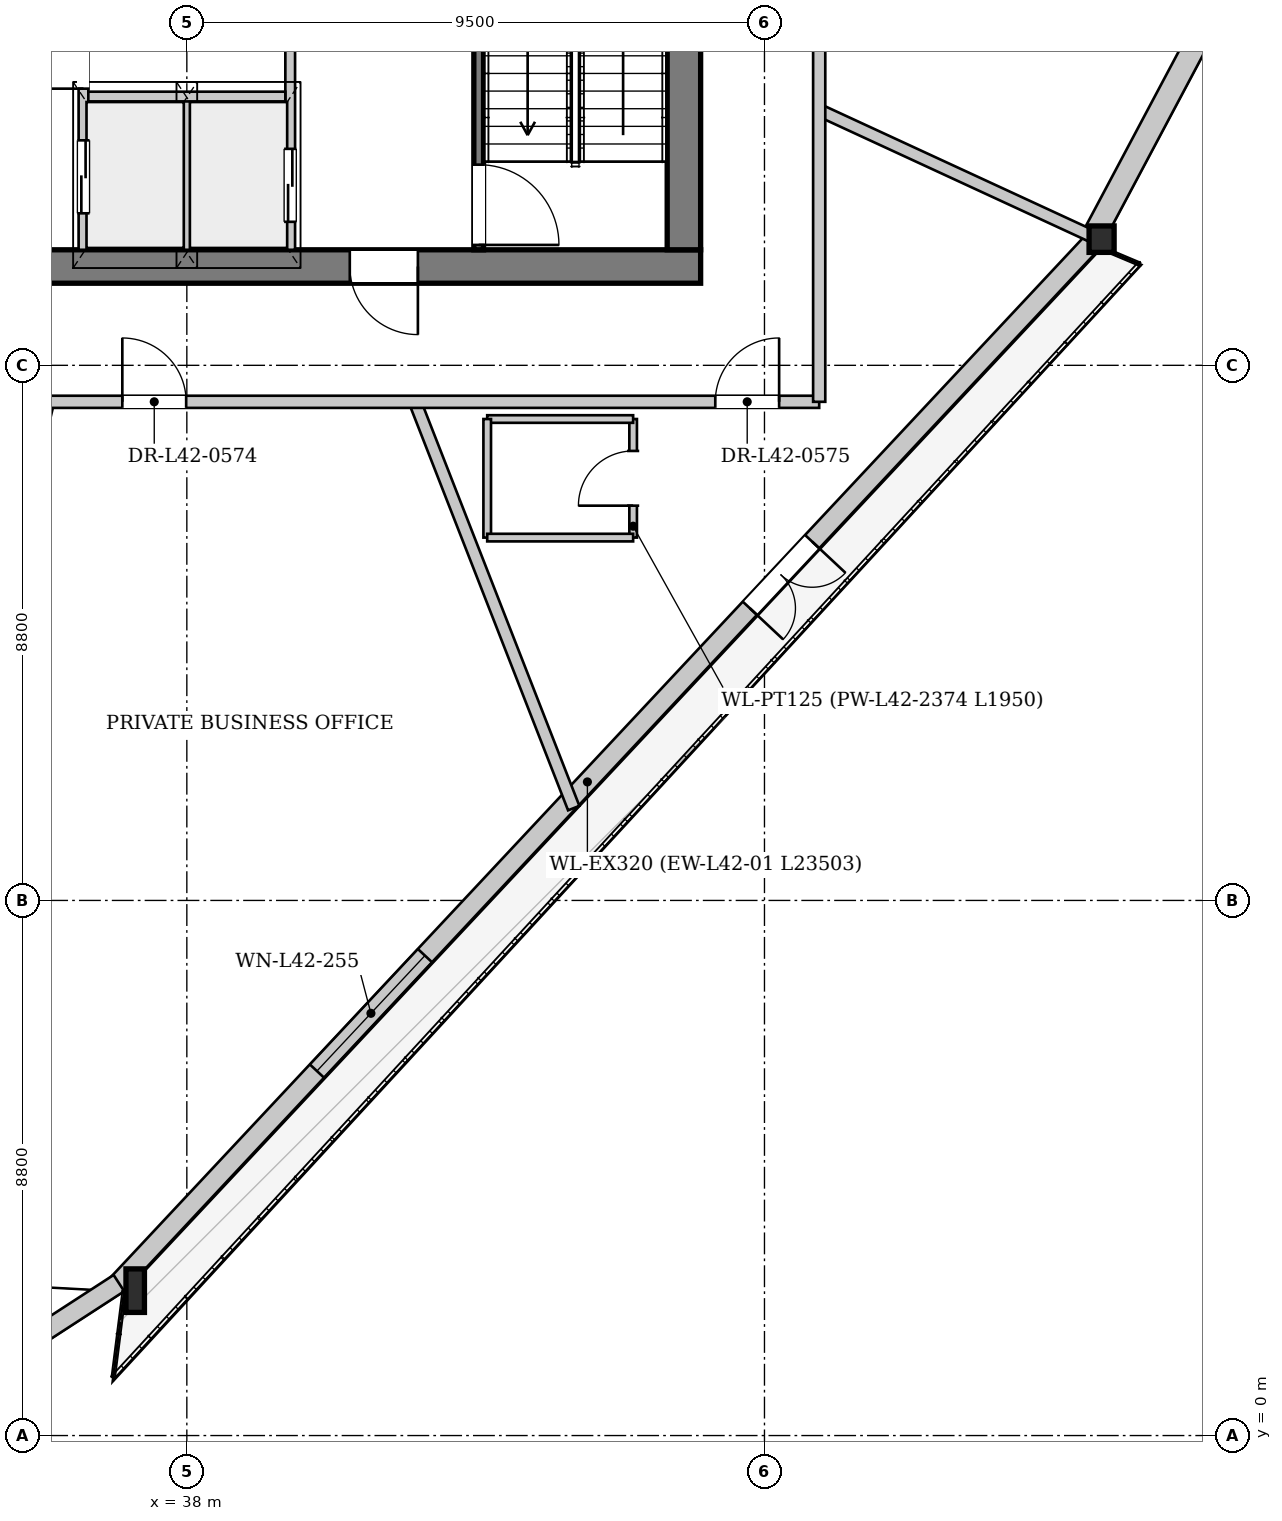
"""IFC4 building model, lengths in metres.
Left out: names, types, materials, properties, quantities, classifications, styles, units other than length and angle.
Written with IfcOpenShell. Run it as: python <this file> out.ifc"""

import sys

from ifc_helpers import new_model, si_unit, direction, frame, frame_2d, origin, origin_2d, place, context, subcontext, project, spatial, rectangle, i_section, extrude, source, transform, mapped, element, fill, save


model = new_model("IFC4")
c1 = context("Model", 3, precision=1e-05, world=origin(), true_north=direction((0.0, 1.0)))
c2 = subcontext(c1, "Body", "Model", "MODEL_VIEW")
j1 = project(units=[si_unit("LENGTHUNIT", "METRE"), si_unit("PLANEANGLEUNIT", "RADIAN")], contexts=[c1])
p1 = place(None, origin())
s1 = spatial("IfcSite", under=j1, at=p1, CompositionType="ELEMENT")
p2 = place(p1, origin())
s2 = spatial("IfcBuilding", under=s1, at=p2, CompositionType="ELEMENT")
p3 = place(p2, frame((0.0, 0.0, 160.8)))
s3 = spatial("IfcBuildingStorey", under=s2, at=p3, CompositionType="ELEMENT", Elevation=160.8)
m1 = source(origin(), c2, "Body", "SweptSolid", [
    extrude(i_section(OverallWidth=0.304, OverallDepth=0.716, WebThickness=0.021, FlangeThickness=0.04, at=origin_2d()), origin(), (0.0, 0.0, 1.0), 3.404),
])
p4 = place(p3, frame((36.97, 2.372, 0.0), z_axis=(0.106280411024, 0.006167419263, 0.994317070744), x_axis=(-0.057932229792, 0.998320518046, 0.0)))
e1 = element("IfcColumn", 1, at=p4, inside=s3, PredefinedType="COLUMN", context=c2, shape_type="MappedRepresentation", body=[
    mapped(m1, transform((0.0, 0.0, 0.0), x_axis=(1.0, 0.0, 0.0), y_axis=(0.0, 1.0, 0.0), z_axis=(0.0, 0.0, 1.0), scale=1.0)),
])
m2 = source(origin(), c2, "Body", "SweptSolid", [
    extrude(i_section(OverallWidth=0.412, OverallDepth=0.435, WebThickness=0.031, FlangeThickness=0.05, at=origin_2d()), origin(), (0.0, 0.0, 1.0), 3.397),
])
p5 = place(p3, frame((53.027, 19.535, 0.0), z_axis=(0.010134590283, 0.08215487017, 0.996568044534), x_axis=(-0.992476960813, 0.122431541098, 0.0)))
e2 = element("IfcColumn", 2, at=p5, inside=s3, PredefinedType="COLUMN", context=c2, shape_type="MappedRepresentation", body=[
    mapped(m2, transform((0.0, 0.0, 0.0), x_axis=(1.0, 0.0, 0.0), y_axis=(0.0, 1.0, 0.0), z_axis=(0.0, 0.0, 1.0), scale=1.0)),
])
p6 = place(p3, frame((52.91, 19.645, 0.0), z_axis=(0.0, 0.0, 1.0), x_axis=(-0.683193045934, -0.730237811941, 0.0)))
e3 = element("IfcWall", 3, at=p6, inside=s3, PredefinedType="SOLIDWALL", context=c2, shape_type="SweptSolid", body=[
    extrude(rectangle(XDim=23.503, YDim=0.32, at=frame_2d((11.752, 0.0))), origin(), (0.0, 0.0, 1.0), 2.722),
])
p7 = place(p6, frame((6.771, 0.0, 0.0)))
e4 = element("IfcOpeningElement", 4, at=p7, cuts=e3, PredefinedType="OPENING", context=c2, shape_type="SweptSolid", body=[
    extrude(rectangle(XDim=1.5, YDim=2.3, at=frame_2d((0.75, 1.15))), frame((0.0, 0.17, 0.0), z_axis=(0.0, -1.0, 0.0), x_axis=(1.0, 0.0, 0.0)), (0.0, 0.0, 1.0), 0.34),
])
p8 = place(p6, frame((16.093, 0.0, 0.252)))
e5 = element("IfcOpeningElement", 5, at=p8, cuts=e3, PredefinedType="OPENING", context=c2, shape_type="SweptSolid", body=[
    extrude(rectangle(XDim=2.6, YDim=2.35, at=frame_2d((1.3, 1.175))), frame((0.0, 0.17, 0.0), z_axis=(0.0, -1.0, 0.0), x_axis=(1.0, 0.0, 0.0)), (0.0, 0.0, 1.0), 0.34),
])
p9 = place(p3, frame((36.883, 2.507, 0.0), z_axis=(0.0, 0.0, 1.0), x_axis=(-0.838789143282, -0.544456401479, 0.0)))
e6 = element("IfcWall", 6, at=p9, inside=s3, PredefinedType="SOLIDWALL", context=c2, shape_type="SweptSolid", body=[
    extrude(rectangle(XDim=2.888, YDim=0.32, at=frame_2d((1.444, 0.0))), origin(), (0.0, 0.0, 1.0), 2.722),
])
p10 = place(p3, frame((63.896, 40.375, 0.0), z_axis=(0.0, 0.0, 1.0), x_axis=(-0.469579724412, -0.882890073804, 0.0)))
e7 = element("IfcWall", 7, at=p10, inside=s3, PredefinedType="SOLIDWALL", context=c2, shape_type="SweptSolid", body=[
    extrude(rectangle(XDim=23.503, YDim=0.38, at=frame_2d((11.751, 0.0))), origin(), (0.0, 0.0, 1.0), 2.722),
])
p11 = place(p10, frame((4.381, 0.0, 0.352)))
e8 = element("IfcOpeningElement", 8, at=p11, cuts=e7, PredefinedType="OPENING", context=c2, shape_type="SweptSolid", body=[
    extrude(rectangle(XDim=2.2, YDim=2.25, at=frame_2d((1.1, 1.125))), frame((0.0, 0.2, 0.0), z_axis=(0.0, -1.0, 0.0), x_axis=(1.0, 0.0, 0.0)), (0.0, 0.0, 1.0), 0.4),
])
p12 = place(p10, frame((15.822, 0.0, 0.352)))
e9 = element("IfcOpeningElement", 9, at=p12, cuts=e7, PredefinedType="OPENING", context=c2, shape_type="SweptSolid", body=[
    extrude(rectangle(XDim=2.2, YDim=2.25, at=frame_2d((1.1, 1.125))), frame((0.0, 0.2, 0.0), z_axis=(0.0, -1.0, 0.0), x_axis=(1.0, 0.0, 0.0)), (0.0, 0.0, 1.0), 0.4),
])
p13 = place(p3, frame((46.45, 19.225, 0.0), z_axis=(0.0, 0.0, 1.0), x_axis=(-1.0, 0.0, 0.0)))
e10 = element("IfcWall", 10, at=p13, inside=s3, PredefinedType="SHEAR", context=c2, shape_type="SweptSolid", body=[
    extrude(rectangle(XDim=16.9, YDim=0.55, at=frame_2d((8.45, 0.0))), origin(), (0.0, 0.0, 1.0), 3.33),
])
p14 = place(p13, frame((4.65, 0.0, 0.0)))
e11 = element("IfcOpeningElement", 11, at=p14, cuts=e10, PredefinedType="OPENING", context=c2, shape_type="SweptSolid", body=[
    extrude(rectangle(XDim=1.12, YDim=2.25, at=frame_2d((0.56, 1.125))), frame((0.0, 0.285, 0.0), z_axis=(0.0, -1.0, 0.0), x_axis=(1.0, 0.0, 0.0)), (0.0, 0.0, 1.0), 0.57),
])
p15 = place(p13, frame((11.15, 0.0, 0.0)))
e12 = element("IfcOpeningElement", 12, at=p15, cuts=e10, PredefinedType="OPENING", context=c2, shape_type="SweptSolid", body=[
    extrude(rectangle(XDim=1.12, YDim=2.25, at=frame_2d((0.56, 1.125))), frame((0.0, 0.285, 0.0), z_axis=(0.0, -1.0, 0.0), x_axis=(1.0, 0.0, 0.0)), (0.0, 0.0, 1.0), 0.57),
])
p16 = place(p3, frame((46.175, 33.7, 0.0), z_axis=(0.0, 0.0, 1.0), x_axis=(0.0, -1.0, 0.0)))
e13 = element("IfcWall", 13, at=p16, inside=s3, PredefinedType="SHEAR", context=c2, shape_type="SweptSolid", body=[
    extrude(rectangle(XDim=14.2, YDim=0.55, at=frame_2d((7.1, 0.0))), origin(), (0.0, 0.0, 1.0), 3.33),
])
p17 = place(p16, frame((5.18, 0.0, 0.0)))
e14 = element("IfcOpeningElement", 14, at=p17, cuts=e13, PredefinedType="OPENING", context=c2, shape_type="SweptSolid", body=[
    extrude(rectangle(XDim=1.6, YDim=2.2, at=frame_2d((0.8, 1.1))), frame((0.0, 0.285, 0.0), z_axis=(0.0, -1.0, 0.0), x_axis=(1.0, 0.0, 0.0)), (0.0, 0.0, 1.0), 0.57),
])
p18 = place(p16, frame((2.05, 0.0, 0.0)))
e15 = element("IfcOpeningElement", 15, at=p18, cuts=e13, PredefinedType="OPENING", context=c2, shape_type="SweptSolid", body=[
    extrude(rectangle(XDim=0.95, YDim=2.1, at=frame_2d((0.475, 1.05))), frame((0.0, 0.285, 0.0), z_axis=(0.0, -1.0, 0.0), x_axis=(1.0, 0.0, 0.0)), (0.0, 0.0, 1.0), 0.57),
])
p19 = place(p3, frame((42.8, 26.96, 0.0), z_axis=(0.0, 0.0, 1.0), x_axis=(0.0, -1.0, 0.0)))
e16 = element("IfcWall", 16, at=p19, inside=s3, PredefinedType="PARTITIONING", context=c2, shape_type="SweptSolid", body=[
    extrude(rectangle(XDim=7.46, YDim=0.16, at=frame_2d((3.73, 0.0))), origin(), (0.0, 0.0, 1.0), 3.33),
])
p20 = place(p19, frame((6.06, 0.0, 0.0)))
e17 = element("IfcOpeningElement", 17, at=p20, cuts=e16, PredefinedType="OPENING", context=c2, shape_type="SweptSolid", body=[
    extrude(rectangle(XDim=1.32, YDim=2.2, at=frame_2d((0.66, 1.1))), frame((0.0, 0.09, 0.0), z_axis=(0.0, -1.0, 0.0), x_axis=(1.0, 0.0, 0.0)), (0.0, 0.0, 1.0), 0.18),
])
p21 = place(p3, frame((36.3, 19.5, 0.0), z_axis=(0.0, 0.0, 1.0), x_axis=(0.0, 1.0, 0.0)))
e18 = element("IfcWall", 18, at=p21, inside=s3, PredefinedType="PARTITIONING", context=c2, shape_type="SweptSolid", body=[
    extrude(rectangle(XDim=4.78, YDim=0.16, at=frame_2d((2.39, 0.0))), origin(), (0.0, 0.0, 1.0), 3.33),
])
p22 = place(p21, frame((0.6, 0.0, 0.0)))
e19 = element("IfcOpeningElement", 19, at=p22, cuts=e18, PredefinedType="OPENING", context=c2, shape_type="SweptSolid", body=[
    extrude(rectangle(XDim=1.2, YDim=2.2, at=frame_2d((0.6, 1.1))), frame((0.0, 0.09, 0.0), z_axis=(0.0, -1.0, 0.0), x_axis=(1.0, 0.0, 0.0)), (0.0, 0.0, 1.0), 0.18),
])
p23 = place(p21, frame((2.65, 0.0, 0.0)))
e20 = element("IfcOpeningElement", 20, at=p23, cuts=e18, PredefinedType="OPENING", context=c2, shape_type="SweptSolid", body=[
    extrude(rectangle(XDim=0.95, YDim=2.1, at=frame_2d((0.475, 1.05))), frame((0.0, 0.09, 0.0), z_axis=(0.0, -1.0, 0.0), x_axis=(1.0, 0.0, 0.0)), (0.0, 0.0, 1.0), 0.18),
])
p24 = place(p3, frame((39.7, 24.28, 0.0), z_axis=(0.0, 0.0, 1.0), x_axis=(0.0, -1.0, 0.0)))
e21 = element("IfcWall", 21, at=p24, inside=s3, PredefinedType="PARTITIONING", context=c2, shape_type="SweptSolid", body=[
    extrude(rectangle(XDim=4.78, YDim=0.16, at=frame_2d((2.39, 0.0))), origin(), (0.0, 0.0, 1.0), 3.33),
])
p25 = place(p24, frame((3.12, 0.0, 0.0)))
e22 = element("IfcOpeningElement", 22, at=p25, cuts=e21, PredefinedType="OPENING", context=c2, shape_type="SweptSolid", body=[
    extrude(rectangle(XDim=1.2, YDim=2.2, at=frame_2d((0.6, 1.1))), frame((0.0, 0.09, 0.0), z_axis=(0.0, -1.0, 0.0), x_axis=(1.0, 0.0, 0.0)), (0.0, 0.0, 1.0), 0.18),
])
p26 = place(p3, frame((38.0, 19.5, 0.0), z_axis=(0.0, 0.0, 1.0), x_axis=(0.0, 1.0, 0.0)))
e23 = element("IfcWall", 23, at=p26, inside=s3, PredefinedType="PARTITIONING", context=c2, shape_type="SweptSolid", body=[
    extrude(rectangle(XDim=2.46, YDim=0.125, at=frame_2d((1.23, 0.0))), origin(), (0.0, 0.0, 1.0), 3.33),
])
p27 = place(p3, frame((36.38, 22.02, 0.0), z_axis=(0.0, 0.0, 1.0), x_axis=(1.0, 0.0, 0.0)))
e24 = element("IfcWall", 24, at=p27, inside=s3, PredefinedType="PARTITIONING", context=c2, shape_type="SweptSolid", body=[
    extrude(rectangle(XDim=3.24, YDim=0.16, at=frame_2d((1.62, 0.0))), origin(), (0.0, 0.0, 1.0), 3.33),
])
p28 = place(p3, frame((35.717, 17.0, 0.0), z_axis=(0.0, 0.0, 1.0), x_axis=(-0.231323404058, -0.972876910372, 0.0)))
e25 = element("IfcWall", 25, at=p28, inside=s3, PredefinedType="PARTITIONING", context=c2, shape_type="SweptSolid", body=[
    extrude(rectangle(XDim=14.664, YDim=0.2, at=frame_2d((7.332, 0.0))), origin(), (0.0, 0.0, 1.0), 3.33),
])
p29 = place(p3, frame((41.752, 17.0, 0.0), z_axis=(0.0, 0.0, 1.0), x_axis=(0.36397970516, -0.931406878991, 0.0)))
e26 = element("IfcWall", 26, at=p29, inside=s3, PredefinedType="PARTITIONING", context=c2, shape_type="SweptSolid", body=[
    extrude(rectangle(XDim=7.174, YDim=0.2, at=frame_2d((3.587, 0.0))), origin(), (0.0, 0.0, 1.0), 3.33),
])
p30 = place(p3, frame((48.4, 21.795, 0.0), z_axis=(0.0, 0.0, 1.0), x_axis=(0.907789198347, -0.419426717515, 0.0)))
e27 = element("IfcWall", 27, at=p30, inside=s3, PredefinedType="PARTITIONING", context=c2, shape_type="SweptSolid", body=[
    extrude(rectangle(XDim=5.125, YDim=0.2, at=frame_2d((2.562, 0.0))), origin(), (0.0, 0.0, 1.0), 2.865),
])
p31 = place(p3, frame((45.34, 14.767, 0.0), z_axis=(0.0, 0.0, 1.0), x_axis=(0.0, 1.0, 0.0)))
e28 = element("IfcWall", 28, at=p31, inside=s3, PredefinedType="PARTITIONING", context=c2, shape_type="SweptSolid", body=[
    extrude(rectangle(XDim=1.95, YDim=0.125, at=frame_2d((0.975, 0.0))), origin(), (0.0, 0.0, 1.0), 3.33),
])
p32 = place(p31, frame((0.525, 0.0, 0.0)))
e29 = element("IfcOpeningElement", 29, at=p32, cuts=e28, PredefinedType="OPENING", context=c2, shape_type="SweptSolid", body=[
    extrude(rectangle(XDim=0.9, YDim=2.1, at=frame_2d((0.45, 1.05))), frame((0.0, 0.073, 0.0), z_axis=(0.0, -1.0, 0.0), x_axis=(1.0, 0.0, 0.0)), (0.0, 0.0, 1.0), 0.145),
])
p33 = place(p3, frame((45.34, 16.717, 0.0), z_axis=(0.0, 0.0, 1.0), x_axis=(-1.0, 0.0, 0.0)))
e30 = element("IfcWall", 30, at=p33, inside=s3, PredefinedType="PARTITIONING", context=c2, shape_type="SweptSolid", body=[
    extrude(rectangle(XDim=2.4, YDim=0.125, at=frame_2d((1.2, 0.0))), origin(), (0.0, 0.0, 1.0), 3.33),
])
p34 = place(p3, frame((42.94, 16.717, 0.0), z_axis=(0.0, 0.0, 1.0), x_axis=(0.0, -1.0, 0.0)))
e31 = element("IfcWall", 31, at=p34, inside=s3, PredefinedType="PARTITIONING", context=c2, shape_type="SweptSolid", body=[
    extrude(rectangle(XDim=1.95, YDim=0.125, at=frame_2d((0.975, 0.0))), origin(), (0.0, 0.0, 1.0), 3.33),
])
p35 = place(p3, frame((42.94, 14.767, 0.0), z_axis=(0.0, 0.0, 1.0), x_axis=(1.0, 0.0, 0.0)))
e32 = element("IfcWall", 32, at=p35, inside=s3, PredefinedType="PARTITIONING", context=c2, shape_type="SweptSolid", body=[
    extrude(rectangle(XDim=2.4, YDim=0.125, at=frame_2d((1.2, 0.0))), origin(), (0.0, 0.0, 1.0), 3.33),
])
p36 = place(p3, frame((27.6, 17.0, 0.0), z_axis=(0.0, 0.0, 1.0), x_axis=(1.0, 0.0, 0.0)))
e33 = element("IfcWall", 33, at=p36, inside=s3, PredefinedType="PARTITIONING", context=c2, shape_type="SweptSolid", body=[
    extrude(rectangle(XDim=20.8, YDim=0.2, at=frame_2d((10.4, 0.0))), origin(), (0.0, 0.0, 1.0), 3.33),
])
p37 = place(p36, frame((2.746, 0.0, 0.0)))
e34 = element("IfcOpeningElement", 34, at=p37, cuts=e33, PredefinedType="OPENING", context=c2, shape_type="SweptSolid", body=[
    extrude(rectangle(XDim=1.05, YDim=2.2, at=frame_2d((0.525, 1.1))), frame((0.0, 0.11, 0.0), z_axis=(0.0, -1.0, 0.0), x_axis=(1.0, 0.0, 0.0)), (0.0, 0.0, 1.0), 0.22),
])
p38 = place(p36, frame((9.339, 0.0, 0.0)))
e35 = element("IfcOpeningElement", 35, at=p38, cuts=e33, PredefinedType="OPENING", context=c2, shape_type="SweptSolid", body=[
    extrude(rectangle(XDim=1.05, YDim=2.2, at=frame_2d((0.525, 1.1))), frame((0.0, 0.11, 0.0), z_axis=(0.0, -1.0, 0.0), x_axis=(1.0, 0.0, 0.0)), (0.0, 0.0, 1.0), 0.22),
])
p39 = place(p36, frame((19.091, 0.0, 0.0)))
e36 = element("IfcOpeningElement", 36, at=p39, cuts=e33, PredefinedType="OPENING", context=c2, shape_type="SweptSolid", body=[
    extrude(rectangle(XDim=1.05, YDim=2.2, at=frame_2d((0.525, 1.1))), frame((0.0, 0.11, 0.0), z_axis=(0.0, -1.0, 0.0), x_axis=(1.0, 0.0, 0.0)), (0.0, 0.0, 1.0), 0.22),
])
p40 = place(p3, frame((48.4, 17.0, 0.0), z_axis=(0.0, 0.0, 1.0), x_axis=(0.0, 1.0, 0.0)))
e37 = element("IfcWall", 37, at=p40, inside=s3, PredefinedType="PARTITIONING", context=c2, shape_type="SweptSolid", body=[
    extrude(rectangle(XDim=19.2, YDim=0.2, at=frame_2d((9.6, 0.0))), origin(), (0.0, 0.0, 1.0), 3.33),
])
p41 = place(p40, frame((7.875, 0.0, 0.0)))
e38 = element("IfcOpeningElement", 38, at=p41, cuts=e37, PredefinedType="OPENING", context=c2, shape_type="SweptSolid", body=[
    extrude(rectangle(XDim=1.05, YDim=2.2, at=frame_2d((0.525, 1.1))), frame((0.0, 0.11, 0.0), z_axis=(0.0, -1.0, 0.0), x_axis=(1.0, 0.0, 0.0)), (0.0, 0.0, 1.0), 0.22),
])
p42 = place(p40, frame((17.85, 0.0, 0.0)))
e39 = element("IfcOpeningElement", 39, at=p42, cuts=e37, PredefinedType="OPENING", context=c2, shape_type="SweptSolid", body=[
    extrude(rectangle(XDim=1.05, YDim=2.2, at=frame_2d((0.525, 1.1))), frame((0.0, 0.11, 0.0), z_axis=(0.0, -1.0, 0.0), x_axis=(1.0, 0.0, 0.0)), (0.0, 0.0, 1.0), 0.22),
])
m3 = source(origin(), c2, "Body", "SweptSolid", [
    extrude(rectangle(XDim=1.5, YDim=2.3, at=frame_2d((0.75, 1.15))), frame((0.0, 0.025, 0.0), z_axis=(0.0, -1.0, 0.0), x_axis=(1.0, 0.0, 0.0)), (0.0, 0.0, 1.0), 0.05),
])
p43 = place(p7, origin())
e40 = element("IfcDoor", 40, at=p43, inside=s3, OperationType="DOUBLE_DOOR_SINGLE_SWING", PredefinedType="DOOR", context=c2, shape_type="MappedRepresentation", body=[
    mapped(m3, transform((0.0, 0.0, 0.0), x_axis=(1.0, 0.0, 0.0), y_axis=(0.0, 1.0, 0.0), z_axis=(0.0, 0.0, 1.0), scale=1.0)),
])
fill(e4, e40)
m4 = source(origin(), c2, "Body", "SweptSolid", [
    extrude(rectangle(XDim=2.6, YDim=2.35, at=frame_2d((1.3, 1.175))), frame((0.0, 0.03, 0.0), z_axis=(0.0, -1.0, 0.0), x_axis=(1.0, 0.0, 0.0)), (0.0, 0.0, 1.0), 0.06),
])
p44 = place(p8, origin())
e41 = element("IfcWindow", 41, at=p44, inside=s3, PartitioningType="SINGLE_PANEL", PredefinedType="WINDOW", context=c2, shape_type="MappedRepresentation", body=[
    mapped(m4, transform((0.0, 0.0, 0.0), x_axis=(1.0, 0.0, 0.0), y_axis=(0.0, 1.0, 0.0), z_axis=(0.0, 0.0, 1.0), scale=1.0)),
])
fill(e5, e41)
m5 = source(origin(), c2, "Body", "SweptSolid", [
    extrude(rectangle(XDim=1.12, YDim=2.25, at=frame_2d((0.56, 1.125))), frame((0.0, 0.025, 0.0), z_axis=(0.0, -1.0, 0.0), x_axis=(1.0, 0.0, 0.0)), (0.0, 0.0, 1.0), 0.05),
])
p45 = place(p14, origin())
e42 = element("IfcDoor", 42, at=p45, inside=s3, OperationType="SINGLE_SWING_LEFT", PredefinedType="DOOR", context=c2, shape_type="MappedRepresentation", body=[
    mapped(m5, transform((0.0, 0.0, 0.0), x_axis=(1.0, 0.0, 0.0), y_axis=(0.0, 1.0, 0.0), z_axis=(0.0, 0.0, 1.0), scale=1.0)),
])
fill(e11, e42)
m6 = source(origin(), c2, "Body", "SweptSolid", [
    extrude(rectangle(XDim=1.32, YDim=2.2, at=frame_2d((0.66, 1.1))), frame((0.0, 0.025, 0.0), z_axis=(0.0, -1.0, 0.0), x_axis=(1.0, 0.0, 0.0)), (0.0, 0.0, 1.0), 0.05),
])
p46 = place(p20, origin())
e43 = element("IfcDoor", 43, at=p46, inside=s3, OperationType="SINGLE_SWING_RIGHT", PredefinedType="DOOR", context=c2, shape_type="MappedRepresentation", body=[
    mapped(m6, transform((0.0, 0.0, 0.0), x_axis=(1.0, 0.0, 0.0), y_axis=(0.0, 1.0, 0.0), z_axis=(0.0, 0.0, 1.0), scale=1.0)),
])
fill(e17, e43)
m7 = source(origin(), c2, "Body", "SweptSolid", [
    extrude(rectangle(XDim=1.2, YDim=2.2, at=frame_2d((0.6, 1.1))), frame((0.0, 0.025, 0.0), z_axis=(0.0, -1.0, 0.0), x_axis=(1.0, 0.0, 0.0)), (0.0, 0.0, 1.0), 0.05),
])
p47 = place(p22, origin())
e44 = element("IfcDoor", 44, at=p47, inside=s3, OperationType="DOUBLE_DOOR_SLIDING", PredefinedType="DOOR", context=c2, shape_type="MappedRepresentation", body=[
    mapped(m7, transform((0.0, 0.0, 0.0), x_axis=(1.0, 0.0, 0.0), y_axis=(0.0, 1.0, 0.0), z_axis=(0.0, 0.0, 1.0), scale=1.0)),
])
fill(e19, e44)
m8 = source(origin(), c2, "Body", "SweptSolid", [
    extrude(rectangle(XDim=0.95, YDim=2.1, at=frame_2d((0.475, 1.05))), frame((0.0, 0.025, 0.0), z_axis=(0.0, -1.0, 0.0), x_axis=(1.0, 0.0, 0.0)), (0.0, 0.0, 1.0), 0.05),
])
p48 = place(p23, origin())
e45 = element("IfcDoor", 45, at=p48, inside=s3, OperationType="SINGLE_SWING_LEFT", PredefinedType="DOOR", context=c2, shape_type="MappedRepresentation", body=[
    mapped(m8, transform((0.0, 0.0, 0.0), x_axis=(1.0, 0.0, 0.0), y_axis=(0.0, 1.0, 0.0), z_axis=(0.0, 0.0, 1.0), scale=1.0)),
])
fill(e20, e45)
p49 = place(p25, origin())
e46 = element("IfcDoor", 46, at=p49, inside=s3, OperationType="DOUBLE_DOOR_SLIDING", PredefinedType="DOOR", context=c2, shape_type="MappedRepresentation", body=[
    mapped(m7, transform((0.0, 0.0, 0.0), x_axis=(1.0, 0.0, 0.0), y_axis=(0.0, 1.0, 0.0), z_axis=(0.0, 0.0, 1.0), scale=1.0)),
])
fill(e22, e46)
m9 = source(origin(), c2, "Body", "SweptSolid", [
    extrude(rectangle(XDim=0.9, YDim=2.1, at=frame_2d((0.45, 1.05))), frame((0.0, 0.025, 0.0), z_axis=(0.0, -1.0, 0.0), x_axis=(1.0, 0.0, 0.0)), (0.0, 0.0, 1.0), 0.05),
])
p50 = place(p32, origin())
e47 = element("IfcDoor", 47, at=p50, inside=s3, OperationType="SINGLE_SWING_LEFT", PredefinedType="DOOR", context=c2, shape_type="MappedRepresentation", body=[
    mapped(m9, transform((0.0, 0.0, 0.0), x_axis=(1.0, 0.0, 0.0), y_axis=(0.0, 1.0, 0.0), z_axis=(0.0, 0.0, 1.0), scale=1.0)),
])
fill(e29, e47)
m10 = source(origin(), c2, "Body", "SweptSolid", [
    extrude(rectangle(XDim=1.05, YDim=2.2, at=frame_2d((0.525, 1.1))), frame((0.0, 0.025, 0.0), z_axis=(0.0, -1.0, 0.0), x_axis=(1.0, 0.0, 0.0)), (0.0, 0.0, 1.0), 0.05),
])
p51 = place(p38, origin())
e48 = element("IfcDoor", 48, at=p51, inside=s3, OperationType="SINGLE_SWING_LEFT", PredefinedType="DOOR", context=c2, shape_type="MappedRepresentation", body=[
    mapped(m10, transform((0.0, 0.0, 0.0), x_axis=(1.0, 0.0, 0.0), y_axis=(0.0, 1.0, 0.0), z_axis=(0.0, 0.0, 1.0), scale=1.0)),
])
fill(e35, e48)
p52 = place(p39, origin())
e49 = element("IfcDoor", 49, at=p52, inside=s3, OperationType="SINGLE_SWING_RIGHT", PredefinedType="DOOR", context=c2, shape_type="MappedRepresentation", body=[
    mapped(m10, transform((0.0, 0.0, 0.0), x_axis=(1.0, 0.0, 0.0), y_axis=(0.0, 1.0, 0.0), z_axis=(0.0, 0.0, 1.0), scale=1.0)),
])
fill(e36, e49)
save(model, sys.argv[1])
